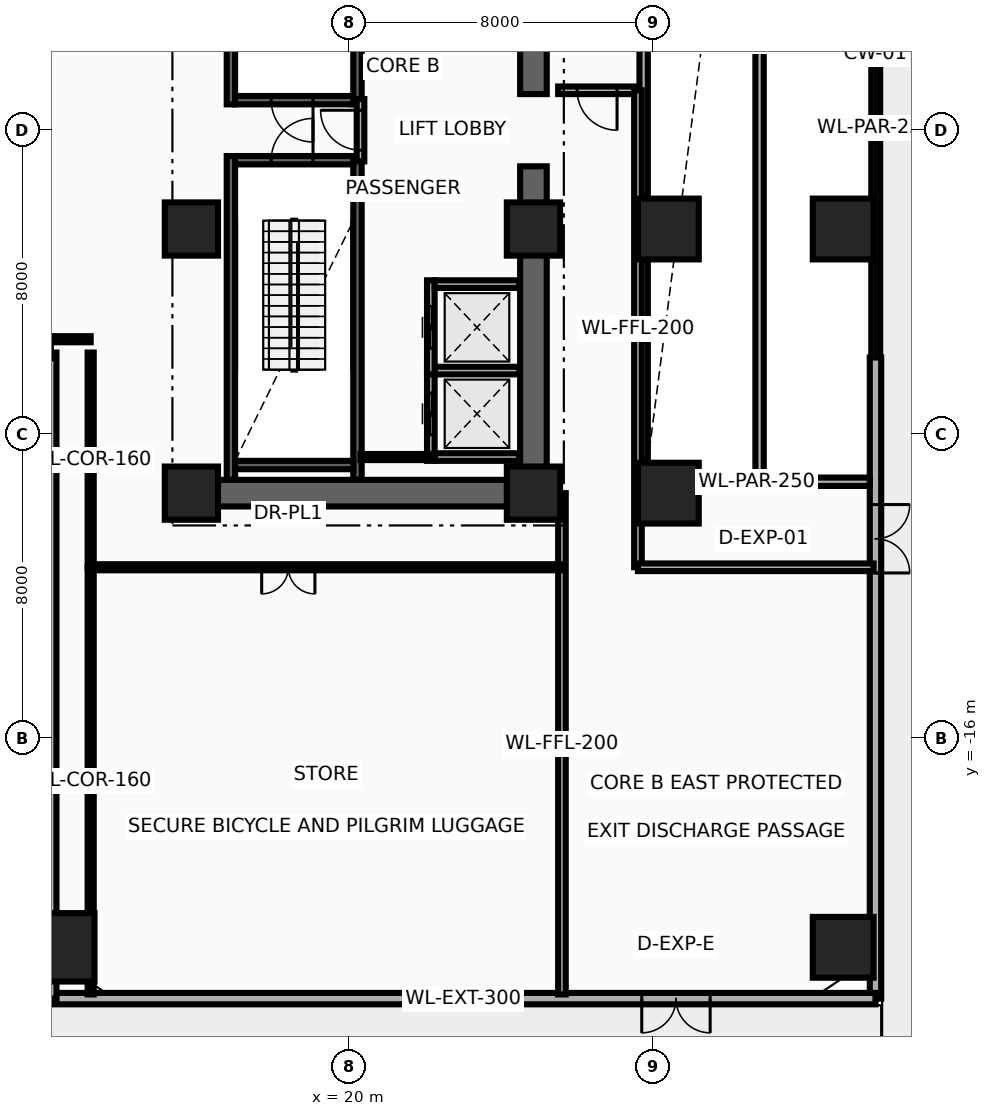
"""IFC4 building model, lengths in metres.
Left out: names, types, materials, properties, quantities, classifications, styles, units other than length and angle.
Written with IfcOpenShell. Run it as: python <this file> out.ifc"""

import sys

from ifc_helpers import new_model, si_unit, direction, frame, frame_2d, origin, origin_2d, place, context, subcontext, project, spatial, rectangle, extrude, source, transform, mapped, element, fill, save


model = new_model("IFC4")
c1 = context("Model", 3, precision=1e-05, world=origin(), true_north=direction((0.0, 1.0)))
c2 = subcontext(c1, "Body", "Model", "MODEL_VIEW")
j1 = project(units=[si_unit("LENGTHUNIT", "METRE"), si_unit("PLANEANGLEUNIT", "RADIAN")], contexts=[c1])
p1 = place(None, origin())
s1 = spatial("IfcSite", under=j1, at=p1, CompositionType="ELEMENT")
p2 = place(p1, origin())
s2 = spatial("IfcBuilding", under=s1, at=p2, CompositionType="ELEMENT")
p3 = place(p2, origin())
s3 = spatial("IfcBuildingStorey", under=s2, at=p3, CompositionType="ELEMENT", Elevation=0.0)
for number, where, z_axis, x_axis in (
    (1, (16.89, 0.68, 0.0), (0.0, 0.0, 1.0), (0.0, 1.0, 0.0)),
    (2, (20.22, 0.68, 0.0), (0.0, 0.0, 1.0), (0.0, 1.0, 0.0)),
):
    element("IfcWall", number, at=place(p3, frame(where, z_axis=z_axis, x_axis=x_axis)), inside=s3, PredefinedType="SHEAR", context=c2, shape_type="SweptSolid", body=[
        extrude(rectangle(XDim=8.52, YDim=0.22, at=frame_2d((4.26, 0.0))), origin(), (0.0, 0.0, 1.0), 4.92),
    ])
p4 = place(p3, frame((17.0, 0.79, 0.0), z_axis=(0.0, 0.0, 1.0), x_axis=(1.0, 0.0, 0.0)))
e3 = element("IfcWall", 3, at=p4, inside=s3, PredefinedType="SHEAR", context=c2, shape_type="SweptSolid", body=[
    extrude(rectangle(XDim=3.11, YDim=0.22, at=frame_2d((1.555, 0.0))), origin(), (0.0, 0.0, 1.0), 4.92),
])
p5 = place(p4, frame((0.95, 0.0, 0.0)))
e4 = element("IfcOpeningElement", 4, at=p5, cuts=e3, PredefinedType="OPENING", context=c2, shape_type="SweptSolid", body=[
    extrude(rectangle(XDim=1.1, YDim=2.15, at=frame_2d((0.55, 1.075))), frame((0.0, 0.125, 0.0), z_axis=(0.0, -1.0, 0.0), x_axis=(1.0, 0.0, 0.0)), (0.0, 0.0, 1.0), 0.25),
])
for number, where, z_axis, x_axis in (
    (5, (16.89, -9.2, 0.0), (0.0, 0.0, 1.0), (0.0, 1.0, 0.0)),
    (6, (20.22, -9.2, 0.0), (0.0, 0.0, 1.0), (0.0, 1.0, 0.0)),
):
    element("IfcWall", number, at=place(p3, frame(where, z_axis=z_axis, x_axis=x_axis)), inside=s3, PredefinedType="SHEAR", context=c2, shape_type="SweptSolid", body=[
        extrude(rectangle(XDim=8.52, YDim=0.22, at=frame_2d((4.26, 0.0))), origin(), (0.0, 0.0, 1.0), 4.92),
    ])
p6 = place(p3, frame((17.0, -8.81, 0.0), z_axis=(0.0, 0.0, 1.0), x_axis=(1.0, 0.0, 0.0)))
e7 = element("IfcWall", 7, at=p6, inside=s3, PredefinedType="SHEAR", context=c2, shape_type="SweptSolid", body=[
    extrude(rectangle(XDim=3.11, YDim=0.22, at=frame_2d((1.555, 0.0))), origin(), (0.0, 0.0, 1.0), 4.92),
])
p7 = place(p3, frame((17.0, -0.79, 0.0), z_axis=(0.0, 0.0, 1.0), x_axis=(1.0, 0.0, 0.0)))
e8 = element("IfcWall", 8, at=p7, inside=s3, PredefinedType="SHEAR", context=c2, shape_type="SweptSolid", body=[
    extrude(rectangle(XDim=3.11, YDim=0.22, at=frame_2d((1.555, 0.0))), origin(), (0.0, 0.0, 1.0), 4.92),
])
p8 = place(p7, frame((0.95, 0.0, 0.0)))
e9 = element("IfcOpeningElement", 9, at=p8, cuts=e8, PredefinedType="OPENING", context=c2, shape_type="SweptSolid", body=[
    extrude(rectangle(XDim=1.1, YDim=2.15, at=frame_2d((0.55, 1.075))), frame((0.0, 0.125, 0.0), z_axis=(0.0, -1.0, 0.0), x_axis=(1.0, 0.0, 0.0)), (0.0, 0.0, 1.0), 0.25),
])
for number, where, z_axis, x_axis in (
    (10, (24.85, -9.9, 0.0), (0.0, 0.0, 1.0), (0.0, 1.0, 0.0)),
    (11, (24.85, 0.95, 0.0), (0.0, 0.0, 1.0), (0.0, 1.0, 0.0)),
):
    element("IfcWall", number, at=place(p3, frame(where, z_axis=z_axis, x_axis=x_axis)), inside=s3, PredefinedType="SHEAR", context=c2, shape_type="SweptSolid", body=[
        extrude(rectangle(XDim=8.95, YDim=0.7, at=frame_2d((4.475, 0.0))), origin(), (0.0, 0.0, 1.0), 4.92),
    ])
p9 = place(p3, frame((15.85, -9.55, 0.0), z_axis=(0.0, 0.0, 1.0), x_axis=(1.0, 0.0, 0.0)))
e12 = element("IfcWall", 12, at=p9, inside=s3, PredefinedType="SHEAR", context=c2, shape_type="SweptSolid", body=[
    extrude(rectangle(XDim=9.0, YDim=0.7, at=frame_2d((4.5, 0.0))), origin(), (0.0, 0.0, 1.0), 4.92),
])
m1 = source(origin(), c2, "Body", "SweptSolid", [
    extrude(rectangle(XDim=1.4, YDim=1.4, at=origin_2d()), origin(), (0.0, 0.0, 1.0), 5.2),
])
for number, where, z_axis, x_axis in (
    (13, (15.85, -9.55, 0.0), (0.0, 0.0, 1.0), (1.0, 0.0, 0.0)),
    (14, (24.85, -9.55, 0.0), (0.0, 0.0, 1.0), (1.0, 0.0, 0.0)),
):
    element("IfcColumn", number, at=place(p3, frame(where, z_axis=z_axis, x_axis=x_axis)), inside=s3, PredefinedType="COLUMN", context=c2, shape_type="MappedRepresentation", body=[
        mapped(m1, transform((0.0, 0.0, 0.0), x_axis=(1.0, 0.0, 0.0), y_axis=(0.0, 1.0, 0.0), z_axis=(0.0, 0.0, 1.0), scale=1.0)),
    ])
m2 = source(origin(), c2, "Body", "SweptSolid", [
    extrude(rectangle(XDim=1.6, YDim=1.6, at=origin_2d()), origin(), (0.0, 0.0, 1.0), 5.2),
])
p10 = place(p3, frame((28.4, -9.55, 0.0), z_axis=(0.0, 0.0, 1.0), x_axis=(1.0, 0.0, 0.0)))
e15 = element("IfcColumn", 15, at=p10, inside=s3, PredefinedType="COLUMN", context=c2, shape_type="MappedRepresentation", body=[
    mapped(m2, transform((0.0, 0.0, 0.0), x_axis=(1.0, 0.0, 0.0), y_axis=(0.0, 1.0, 0.0), z_axis=(0.0, 0.0, 1.0), scale=1.0)),
])
for number, where, z_axis, x_axis in (
    (16, (15.85, -2.6, 0.0), (0.0, 0.0, 1.0), (1.0, 0.0, 0.0)),
    (17, (24.85, -2.6, 0.0), (0.0, 0.0, 1.0), (1.0, 0.0, 0.0)),
):
    element("IfcColumn", number, at=place(p3, frame(where, z_axis=z_axis, x_axis=x_axis)), inside=s3, PredefinedType="COLUMN", context=c2, shape_type="MappedRepresentation", body=[
        mapped(m1, transform((0.0, 0.0, 0.0), x_axis=(1.0, 0.0, 0.0), y_axis=(0.0, 1.0, 0.0), z_axis=(0.0, 0.0, 1.0), scale=1.0)),
    ])
p11 = place(p3, frame((28.4, -2.6, 0.0), z_axis=(0.0, 0.0, 1.0), x_axis=(1.0, 0.0, 0.0)))
e18 = element("IfcColumn", 18, at=p11, inside=s3, PredefinedType="COLUMN", context=c2, shape_type="MappedRepresentation", body=[
    mapped(m2, transform((0.0, 0.0, 0.0), x_axis=(1.0, 0.0, 0.0), y_axis=(0.0, 1.0, 0.0), z_axis=(0.0, 0.0, 1.0), scale=1.0)),
])
m3 = source(origin(), c2, "Body", "SweptSolid", [
    extrude(rectangle(XDim=1.8, YDim=1.8, at=origin_2d()), origin(), (0.0, 0.0, 1.0), 5.2),
])
p12 = place(p3, frame((12.4, -21.5, 0.0), z_axis=(0.0, 0.0, 1.0), x_axis=(1.0, 0.0, 0.0)))
e19 = element("IfcColumn", 19, at=p12, inside=s3, PredefinedType="COLUMN", context=c2, shape_type="MappedRepresentation", body=[
    mapped(m3, transform((0.0, 0.0, 0.0), x_axis=(1.0, 0.0, 0.0), y_axis=(0.0, 1.0, 0.0), z_axis=(0.0, 0.0, 1.0), scale=1.0)),
])
for number, where, z_axis, x_axis in (
    (20, (33.0, -2.6, 0.0), (0.0, 0.0, 1.0), (1.0, 0.0, 0.0)),
    (21, (33.0, -21.5, 0.0), (0.0, 0.0, 1.0), (1.0, 0.0, 0.0)),
):
    element("IfcColumn", number, at=place(p3, frame(where, z_axis=z_axis, x_axis=x_axis)), inside=s3, PredefinedType="COLUMN", context=c2, shape_type="MappedRepresentation", body=[
        mapped(m2, transform((0.0, 0.0, 0.0), x_axis=(1.0, 0.0, 0.0), y_axis=(0.0, 1.0, 0.0), z_axis=(0.0, 0.0, 1.0), scale=1.0)),
    ])
p13 = place(p3, frame((33.85, -22.85, 0.0), z_axis=(0.0, 0.0, 1.0), x_axis=(0.0, 1.0, 0.0)))
e22 = element("IfcWall", 22, at=p13, inside=s3, PredefinedType="SOLIDWALL", context=c2, shape_type="SweptSolid", body=[
    extrude(rectangle(XDim=16.87, YDim=0.3, at=frame_2d((8.435, 0.0))), origin(), (0.0, 0.0, 1.0), 4.92),
])
p14 = place(p13, frame((11.2, 0.0, 0.0)))
e23 = element("IfcOpeningElement", 23, at=p14, cuts=e22, PredefinedType="OPENING", context=c2, shape_type="SweptSolid", body=[
    extrude(rectangle(XDim=1.8, YDim=2.2, at=frame_2d((0.9, 1.1))), frame((0.0, 0.165, 0.0), z_axis=(0.0, -1.0, 0.0), x_axis=(1.0, 0.0, 0.0)), (0.0, 0.0, 1.0), 0.33),
])
p15 = place(p3, frame((12.15, -22.85, 0.0), z_axis=(0.0, 0.0, 1.0), x_axis=(1.0, 0.0, 0.0)))
e24 = element("IfcWall", 24, at=p15, inside=s3, PredefinedType="SOLIDWALL", context=c2, shape_type="SweptSolid", body=[
    extrude(rectangle(XDim=21.7, YDim=0.3, at=frame_2d((10.85, 0.0))), origin(), (0.0, 0.0, 1.0), 4.92),
])
p16 = place(p15, frame((15.55, 0.0, 0.0)))
e25 = element("IfcOpeningElement", 25, at=p16, cuts=e24, PredefinedType="OPENING", context=c2, shape_type="SweptSolid", body=[
    extrude(rectangle(XDim=1.8, YDim=2.2, at=frame_2d((0.9, 1.1))), frame((0.0, 0.165, 0.0), z_axis=(0.0, -1.0, 0.0), x_axis=(1.0, 0.0, 0.0)), (0.0, 0.0, 1.0), 0.33),
])
p17 = place(p3, frame((12.15, -22.85, 0.0), z_axis=(0.0, 0.0, 1.0), x_axis=(0.0, 1.0, 0.0)))
e26 = element("IfcWall", 26, at=p17, inside=s3, PredefinedType="SOLIDWALL", context=c2, shape_type="SweptSolid", body=[
    extrude(rectangle(XDim=17.0, YDim=0.3, at=frame_2d((8.5, 0.0))), origin(), (0.0, 0.0, 1.0), 3.957),
])
p18 = place(p3, frame((27.75, -9.25, 0.0), z_axis=(0.0, 0.0, 1.0), x_axis=(0.0, 1.0, 0.0)))
e27 = element("IfcWall", 27, at=p18, inside=s3, PredefinedType="PARAPET", context=c2, shape_type="SweptSolid", body=[
    extrude(rectangle(XDim=23.6, YDim=0.22, at=frame_2d((11.8, 0.0))), origin(), (0.0, 0.0, 1.0), 1.35),
])
p19 = place(p3, frame((33.85, -5.85, 0.0), z_axis=(0.0, 0.0, 1.0), x_axis=(0.0, 1.0, 0.0)))
e28 = element("IfcWall", 28, at=p19, inside=s3, PredefinedType="PARAPET", context=c2, shape_type="SweptSolid", body=[
    extrude(rectangle(XDim=11.8, YDim=0.22, at=frame_2d((5.9, 0.0))), origin(), (0.0, 0.0, 1.0), 1.35),
])
p20 = place(p3, frame((27.75, -9.25, 0.0), z_axis=(0.0, 0.0, 1.0), x_axis=(1.0, 0.0, 0.0)))
e29 = element("IfcWall", 29, at=p20, inside=s3, PredefinedType="PARAPET", context=c2, shape_type="SweptSolid", body=[
    extrude(rectangle(XDim=5.95, YDim=0.22, at=frame_2d((2.975, 0.0))), origin(), (0.0, 0.0, 1.0), 1.35),
])
p21 = place(p3, frame((30.8, -9.25, 0.0), z_axis=(0.0, 0.0, 1.0), x_axis=(0.0, 1.0, 0.0)))
e30 = element("IfcWall", 30, at=p21, inside=s3, PredefinedType="PARAPET", context=c2, shape_type="SweptSolid", body=[
    extrude(rectangle(XDim=23.2, YDim=0.22, at=frame_2d((11.6, 0.0))), origin(), (0.0, 0.0, 1.0), 1.35),
])
p22 = place(p3, frame((22.15, -8.7, 0.0), z_axis=(0.0, 0.0, 1.0), x_axis=(0.0, 1.0, 0.0)))
e31 = element("IfcWall", 31, at=p22, inside=s3, PredefinedType="MOVABLE", context=c2, shape_type="SweptSolid", body=[
    extrude(rectangle(XDim=2.475, YDim=0.2, at=frame_2d((1.237, 0.0))), origin(), (0.0, 0.0, 1.0), 4.92),
])
p23 = place(p22, frame((0.688, 0.0, 0.0)))
e32 = element("IfcOpeningElement", 32, at=p23, cuts=e31, PredefinedType="OPENING", context=c2, shape_type="SweptSolid", body=[
    extrude(rectangle(XDim=1.1, YDim=2.1, at=frame_2d((0.55, 1.05))), frame((0.0, 0.115, 0.0), z_axis=(0.0, -1.0, 0.0), x_axis=(1.0, 0.0, 0.0)), (0.0, 0.0, 1.0), 0.23),
])
for number, where, z_axis, x_axis in (
    (33, (22.25, -8.6, 0.0), (0.0, 0.0, 1.0), (1.0, 0.0, 0.0)),
    (34, (22.25, -6.325, 0.0), (0.0, 0.0, 1.0), (1.0, 0.0, 0.0)),
):
    element("IfcWall", number, at=place(p3, frame(where, z_axis=z_axis, x_axis=x_axis)), inside=s3, PredefinedType="MOVABLE", context=c2, shape_type="SweptSolid", body=[
        extrude(rectangle(XDim=2.23, YDim=0.2, at=frame_2d((1.115, 0.0))), origin(), (0.0, 0.0, 1.0), 4.92),
    ])
p24 = place(p3, frame((22.15, -6.425, 0.0), z_axis=(0.0, 0.0, 1.0), x_axis=(0.0, 1.0, 0.0)))
e35 = element("IfcWall", 35, at=p24, inside=s3, PredefinedType="MOVABLE", context=c2, shape_type="SweptSolid", body=[
    extrude(rectangle(XDim=2.475, YDim=0.2, at=frame_2d((1.238, 0.0))), origin(), (0.0, 0.0, 1.0), 4.92),
])
p25 = place(p24, frame((0.688, 0.0, 0.0)))
e36 = element("IfcOpeningElement", 36, at=p25, cuts=e35, PredefinedType="OPENING", context=c2, shape_type="SweptSolid", body=[
    extrude(rectangle(XDim=1.1, YDim=2.1, at=frame_2d((0.55, 1.05))), frame((0.0, 0.115, 0.0), z_axis=(0.0, -1.0, 0.0), x_axis=(1.0, 0.0, 0.0)), (0.0, 0.0, 1.0), 0.23),
])
p26 = place(p3, frame((22.25, -4.05, 0.0), z_axis=(0.0, 0.0, 1.0), x_axis=(1.0, 0.0, 0.0)))
e37 = element("IfcWall", 37, at=p26, inside=s3, PredefinedType="MOVABLE", context=c2, shape_type="SweptSolid", body=[
    extrude(rectangle(XDim=2.23, YDim=0.2, at=frame_2d((1.115, 0.0))), origin(), (0.0, 0.0, 1.0), 4.92),
])
p27 = place(p3, frame((20.3, -0.82, 0.0), z_axis=(0.0, 0.0, 1.0), x_axis=(0.0, 1.0, 0.0)))
e38 = element("IfcWall", 38, at=p27, inside=s3, PredefinedType="PARTITIONING", context=c2, shape_type="SweptSolid", body=[
    extrude(rectangle(XDim=1.64, YDim=0.2, at=frame_2d((0.82, 0.0))), origin(), (0.0, 0.0, 1.0), 4.92),
])
p28 = place(p27, frame((0.295, 0.0, 0.0)))
e39 = element("IfcOpeningElement", 39, at=p28, cuts=e38, PredefinedType="OPENING", context=c2, shape_type="SweptSolid", body=[
    extrude(rectangle(XDim=1.05, YDim=2.15, at=frame_2d((0.525, 1.075))), frame((0.0, 0.115, 0.0), z_axis=(0.0, -1.0, 0.0), x_axis=(1.0, 0.0, 0.0)), (0.0, 0.0, 1.0), 0.23),
])
p29 = place(p3, frame((20.3, -8.6, 0.0), z_axis=(0.0, 0.0, 1.0), x_axis=(1.0, 0.0, 0.0)))
e40 = element("IfcWall", 40, at=p29, inside=s3, PredefinedType="PARTITIONING", context=c2, shape_type="SweptSolid", body=[
    extrude(rectangle(XDim=1.82, YDim=0.16, at=frame_2d((0.91, 0.0))), origin(), (0.0, 0.0, 1.0), 4.92),
])
p30 = place(p3, frame((25.5, 1.05, 0.0), z_axis=(0.0, 0.0, 1.0), x_axis=(1.0, 0.0, 0.0)))
e41 = element("IfcWall", 41, at=p30, inside=s3, PredefinedType="PARTITIONING", context=c2, shape_type="SweptSolid", body=[
    extrude(rectangle(XDim=2.1, YDim=0.2, at=frame_2d((1.05, 0.0))), origin(), (0.0, 0.0, 1.0), 4.92),
])
p31 = place(p30, frame((0.5, 0.0, 0.0)))
e42 = element("IfcOpeningElement", 42, at=p31, cuts=e41, PredefinedType="OPENING", context=c2, shape_type="SweptSolid", body=[
    extrude(rectangle(XDim=1.05, YDim=2.15, at=frame_2d((0.525, 1.075))), frame((0.0, 0.115, 0.0), z_axis=(0.0, -1.0, 0.0), x_axis=(1.0, 0.0, 0.0)), (0.0, 0.0, 1.0), 0.23),
])
p32 = place(p3, frame((25.6, -22.74, 0.0), z_axis=(0.0, 0.0, 1.0), x_axis=(0.0, 1.0, 0.0)))
e43 = element("IfcWall", 43, at=p32, inside=s3, PredefinedType="PARTITIONING", context=c2, shape_type="SweptSolid", body=[
    extrude(rectangle(XDim=13.19, YDim=0.2, at=frame_2d((6.595, 0.0))), origin(), (0.0, 0.0, 1.0), 3.957),
])
p33 = place(p3, frame((27.6, -11.5, 0.0), z_axis=(0.0, 0.0, 1.0), x_axis=(0.0, 1.0, 0.0)))
e44 = element("IfcWall", 44, at=p33, inside=s3, PredefinedType="PARTITIONING", context=c2, shape_type="SweptSolid", body=[
    extrude(rectangle(XDim=12.55, YDim=0.2, at=frame_2d((6.275, 0.0))), origin(), (0.0, 0.0, 1.0), 3.957),
])
p34 = place(p3, frame((27.6, -11.5, 0.0), z_axis=(0.0, 0.0, 1.0), x_axis=(1.0, 0.0, 0.0)))
e45 = element("IfcWall", 45, at=p34, inside=s3, PredefinedType="PARTITIONING", context=c2, shape_type="SweptSolid", body=[
    extrude(rectangle(XDim=6.2, YDim=0.2, at=frame_2d((3.1, 0.0))), origin(), (0.0, 0.0, 1.0), 4.356),
])
p35 = place(p3, frame((13.2, -11.5, 0.0), z_axis=(0.0, 0.0, 1.0), x_axis=(1.0, 0.0, 0.0)))
e46 = element("IfcWall", 46, at=p35, inside=s3, PredefinedType="PARTITIONING", context=c2, shape_type="SweptSolid", body=[
    extrude(rectangle(XDim=12.4, YDim=0.16, at=frame_2d((6.2, 0.0))), origin(), (0.0, 0.0, 1.0), 4.92),
])
p36 = place(p35, frame((4.5, 0.0, 0.0)))
e47 = element("IfcOpeningElement", 47, at=p36, cuts=e46, PredefinedType="OPENING", context=c2, shape_type="SweptSolid", body=[
    extrude(rectangle(XDim=1.4, YDim=2.15, at=frame_2d((0.7, 1.075))), frame((0.0, 0.095, 0.0), z_axis=(0.0, -1.0, 0.0), x_axis=(1.0, 0.0, 0.0)), (0.0, 0.0, 1.0), 0.19),
])
p37 = place(p3, frame((13.2, -22.74, 0.0), z_axis=(0.0, 0.0, 1.0), x_axis=(0.0, 1.0, 0.0)))
e48 = element("IfcWall", 48, at=p37, inside=s3, PredefinedType="PARTITIONING", context=c2, shape_type="SweptSolid", body=[
    extrude(rectangle(XDim=11.24, YDim=0.16, at=frame_2d((5.62, 0.0))), origin(), (0.0, 0.0, 1.0), 4.92),
])
p38 = place(p3, frame((13.2, -11.5, 0.0), z_axis=(0.0, 0.0, 1.0), x_axis=(0.0, 1.0, 0.0)))
e49 = element("IfcWall", 49, at=p38, inside=s3, PredefinedType="PARTITIONING", context=c2, shape_type="SweptSolid", body=[
    extrude(rectangle(XDim=5.65, YDim=0.16, at=frame_2d((2.825, 0.0))), origin(), (0.0, 0.0, 1.0), 3.957),
])
p39 = place(p3, frame((9.55, -5.5, 0.0), z_axis=(0.0, 0.0, 1.0), x_axis=(1.0, 0.0, 0.0)))
e50 = element("IfcWall", 50, at=p39, inside=s3, PredefinedType="PARTITIONING", context=c2, shape_type="SweptSolid", body=[
    extrude(rectangle(XDim=3.65, YDim=0.16, at=frame_2d((1.825, 0.0))), origin(), (0.0, 0.0, 1.0), 4.92),
])
p40 = place(p16, frame((1.8, 0.0, 0.0), z_axis=(0.0, 0.0, 1.0), x_axis=(-1.0, 0.0, 0.0)))
e51 = element("IfcDoor", 51, at=p40, inside=s3, OperationType="SINGLE_SWING_LEFT", PredefinedType="DOOR", context=c2, shape_type="SweptSolid", body=[
    extrude(rectangle(XDim=1.8, YDim=2.2, at=frame_2d((0.9, 1.1))), frame((0.0, 0.025, 0.0), z_axis=(0.0, -1.0, 0.0), x_axis=(1.0, 0.0, 0.0)), (0.0, 0.0, 1.0), 0.05),
])
fill(e25, e51)
p41 = place(p14, frame((1.8, 0.0, 0.0), z_axis=(0.0, 0.0, 1.0), x_axis=(-1.0, 0.0, 0.0)))
e52 = element("IfcDoor", 52, at=p41, inside=s3, OperationType="SINGLE_SWING_LEFT", PredefinedType="DOOR", context=c2, shape_type="SweptSolid", body=[
    extrude(rectangle(XDim=1.8, YDim=2.2, at=frame_2d((0.9, 1.1))), frame((0.0, 0.025, 0.0), z_axis=(0.0, -1.0, 0.0), x_axis=(1.0, 0.0, 0.0)), (0.0, 0.0, 1.0), 0.05),
])
fill(e23, e52)
p42 = place(p23, origin())
e53 = element("IfcDoor", 53, at=p42, inside=s3, OperationType="DOUBLE_DOOR_SLIDING", PredefinedType="DOOR", context=c2, shape_type="SweptSolid", body=[
    extrude(rectangle(XDim=1.1, YDim=2.1, at=frame_2d((0.55, 1.05))), frame((0.0, 0.025, 0.0), z_axis=(0.0, -1.0, 0.0), x_axis=(1.0, 0.0, 0.0)), (0.0, 0.0, 1.0), 0.05),
])
fill(e32, e53)
p43 = place(p25, origin())
e54 = element("IfcDoor", 54, at=p43, inside=s3, OperationType="DOUBLE_DOOR_SLIDING", PredefinedType="DOOR", context=c2, shape_type="SweptSolid", body=[
    extrude(rectangle(XDim=1.1, YDim=2.1, at=frame_2d((0.55, 1.05))), frame((0.0, 0.025, 0.0), z_axis=(0.0, -1.0, 0.0), x_axis=(1.0, 0.0, 0.0)), (0.0, 0.0, 1.0), 0.05),
])
fill(e36, e54)
p44 = place(p28, origin())
e55 = element("IfcDoor", 55, at=p44, inside=s3, OperationType="SINGLE_SWING_RIGHT", PredefinedType="DOOR", context=c2, shape_type="SweptSolid", body=[
    extrude(rectangle(XDim=1.05, YDim=2.15, at=frame_2d((0.525, 1.075))), frame((0.0, 0.025, 0.0), z_axis=(0.0, -1.0, 0.0), x_axis=(1.0, 0.0, 0.0)), (0.0, 0.0, 1.0), 0.05),
])
fill(e39, e55)
p45 = place(p5, frame((1.1, 0.0, 0.0), z_axis=(0.0, 0.0, 1.0), x_axis=(-1.0, 0.0, 0.0)))
e56 = element("IfcDoor", 56, at=p45, inside=s3, OperationType="SINGLE_SWING_LEFT", PredefinedType="DOOR", context=c2, shape_type="SweptSolid", body=[
    extrude(rectangle(XDim=1.1, YDim=2.15, at=frame_2d((0.55, 1.075))), frame((0.0, 0.025, 0.0), z_axis=(0.0, -1.0, 0.0), x_axis=(1.0, 0.0, 0.0)), (0.0, 0.0, 1.0), 0.05),
])
fill(e4, e56)
p46 = place(p8, origin())
e57 = element("IfcDoor", 57, at=p46, inside=s3, OperationType="SINGLE_SWING_RIGHT", PredefinedType="DOOR", context=c2, shape_type="SweptSolid", body=[
    extrude(rectangle(XDim=1.1, YDim=2.15, at=frame_2d((0.55, 1.075))), frame((0.0, 0.025, 0.0), z_axis=(0.0, -1.0, 0.0), x_axis=(1.0, 0.0, 0.0)), (0.0, 0.0, 1.0), 0.05),
])
fill(e9, e57)
p47 = place(p31, frame((1.05, 0.0, 0.0), z_axis=(0.0, 0.0, 1.0), x_axis=(-1.0, 0.0, 0.0)))
e58 = element("IfcDoor", 58, at=p47, inside=s3, OperationType="SINGLE_SWING_RIGHT", PredefinedType="DOOR", context=c2, shape_type="SweptSolid", body=[
    extrude(rectangle(XDim=1.05, YDim=2.15, at=frame_2d((0.525, 1.075))), frame((0.0, 0.025, 0.0), z_axis=(0.0, -1.0, 0.0), x_axis=(1.0, 0.0, 0.0)), (0.0, 0.0, 1.0), 0.05),
])
fill(e42, e58)
p48 = place(p36, frame((1.4, 0.0, 0.0), z_axis=(0.0, 0.0, 1.0), x_axis=(-1.0, 0.0, 0.0)))
e59 = element("IfcDoor", 59, at=p48, inside=s3, OperationType="DOUBLE_DOOR_SINGLE_SWING", PredefinedType="DOOR", context=c2, shape_type="SweptSolid", body=[
    extrude(rectangle(XDim=1.4, YDim=2.15, at=frame_2d((0.7, 1.075))), frame((0.0, 0.025, 0.0), z_axis=(0.0, -1.0, 0.0), x_axis=(1.0, 0.0, 0.0)), (0.0, 0.0, 1.0), 0.05),
])
fill(e47, e59)
save(model, sys.argv[1])
